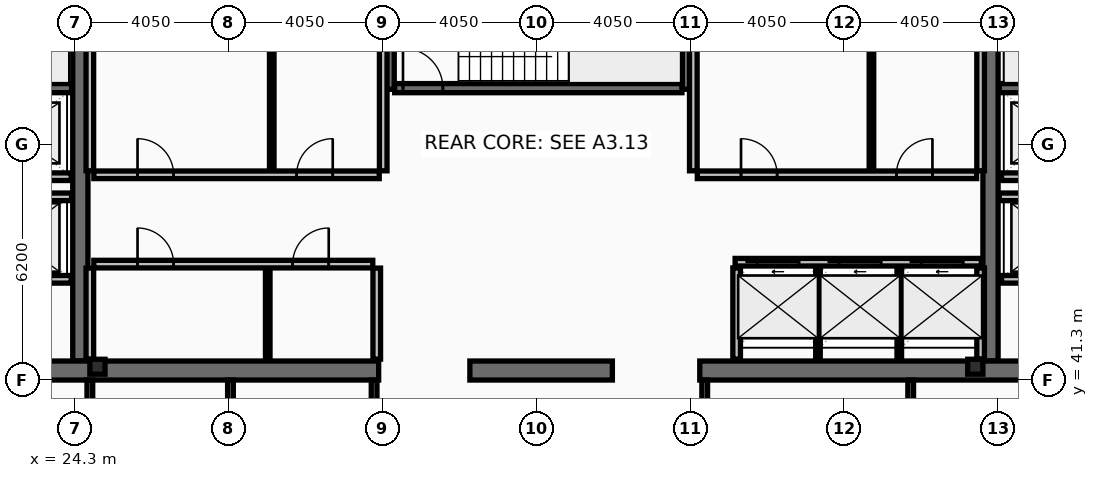
"""IFC4 building model, lengths in metres.
Left out: names, types, materials, properties, quantities, classifications, styles, units other than length and angle.
Written with IfcOpenShell. Run it as: python <this file> out.ifc"""

import sys

from ifc_helpers import new_model, si_unit, direction, frame, frame_2d, origin, origin_2d, place, context, subcontext, project, spatial, rectangle, i_section, extrude, element, fill, save


model = new_model("IFC4")
c1 = context("Model", 3, precision=1e-05, world=origin(), true_north=direction((0.0, 1.0)))
c2 = subcontext(c1, "Body", "Model", "MODEL_VIEW")
j1 = project(units=[si_unit("LENGTHUNIT", "METRE"), si_unit("PLANEANGLEUNIT", "RADIAN")], contexts=[c1])
p1 = place(None, origin())
s1 = spatial("IfcSite", under=j1, at=p1, CompositionType="ELEMENT")
p2 = place(p1, origin())
s2 = spatial("IfcBuilding", under=s1, at=p2, CompositionType="ELEMENT")
p3 = place(p2, frame((0.0, 0.0, 314.6)))
s3 = spatial("IfcBuildingStorey", under=s2, at=p3, CompositionType="ELEMENT", Elevation=314.6)
for number, where, z_axis, x_axis in (
    (1, (24.45, 41.8, 0.0), (0.0, 0.0, 1.0), (0.0, 1.0, 0.0)),
    (2, (48.4, 41.8, 0.0), (0.0, 0.0, 1.0), (0.0, 1.0, 0.0)),
):
    element("IfcWall", number, at=place(p3, frame(where, z_axis=z_axis, x_axis=x_axis)), inside=s3, PredefinedType="SHEAR", context=c2, shape_type="SweptSolid", body=[
        extrude(rectangle(XDim=11.4, YDim=0.4, at=frame_2d((5.7, 0.0))), origin(), (0.0, 0.0, 1.0), 3.44),
    ])
p4 = place(p3, frame((32.3, 41.55, 0.0), z_axis=(0.0, 0.0, 1.0), x_axis=(-1.0, 0.0, 0.0)))
e3 = element("IfcWall", 3, at=p4, inside=s3, PredefinedType="SHEAR", context=c2, shape_type="SweptSolid", body=[
    extrude(rectangle(XDim=11.45, YDim=0.5, at=frame_2d((5.725, 0.0))), origin(), (0.0, 0.0, 1.0), 3.44),
])
p5 = place(p3, frame((38.45, 41.55, 0.0), z_axis=(0.0, 0.0, 1.0), x_axis=(-1.0, 0.0, 0.0)))
e4 = element("IfcWall", 4, at=p5, inside=s3, PredefinedType="SHEAR", context=c2, shape_type="SweptSolid", body=[
    extrude(rectangle(XDim=3.75, YDim=0.5, at=frame_2d((1.875, 0.0))), origin(), (0.0, 0.0, 1.0), 3.44),
])
p6 = place(p3, frame((52.05, 41.55, 0.0), z_axis=(0.0, 0.0, 1.0), x_axis=(-1.0, 0.0, 0.0)))
e5 = element("IfcWall", 5, at=p6, inside=s3, PredefinedType="SHEAR", context=c2, shape_type="SweptSolid", body=[
    extrude(rectangle(XDim=11.3, YDim=0.5, at=frame_2d((5.65, 0.0))), origin(), (0.0, 0.0, 1.0), 3.44),
])
for number, where, z_axis, x_axis in (
    (6, (32.58, 48.95, 0.0), (0.0, 0.0, 1.0), (0.0, 1.0, 0.0)),
    (7, (40.42, 48.95, 0.0), (0.0, 0.0, 1.0), (0.0, 1.0, 0.0)),
):
    element("IfcWall", number, at=place(p3, frame(where, z_axis=z_axis, x_axis=x_axis)), inside=s3, PredefinedType="SHEAR", context=c2, shape_type="SweptSolid", body=[
        extrude(rectangle(XDim=4.25, YDim=0.26, at=frame_2d((2.125, 0.0))), origin(), (0.0, 0.0, 1.0), 3.44),
    ])
p7 = place(p3, frame((16.7, 48.98, 0.0), z_axis=(0.0, 0.0, 1.0), x_axis=(1.0, 0.0, 0.0)))
e8 = element("IfcWall", 8, at=p7, inside=s3, PredefinedType="SHEAR", context=c2, shape_type="SweptSolid", body=[
    extrude(rectangle(XDim=7.52, YDim=0.24, at=frame_2d((3.76, 0.0))), origin(), (0.0, 0.0, 1.0), 3.44),
])
p8 = place(p7, frame((0.22, 0.0, 0.0)))
e9 = element("IfcOpeningElement", 9, at=p8, cuts=e8, PredefinedType="OPENING", context=c2, shape_type="SweptSolid", body=[
    extrude(rectangle(XDim=1.05, YDim=2.15, at=frame_2d((0.525, 1.075))), frame((0.0, 0.13, 0.0), z_axis=(0.0, -1.0, 0.0), x_axis=(1.0, 0.0, 0.0)), (0.0, 0.0, 1.0), 0.26),
])
p9 = place(p3, frame((48.63, 48.98, 0.0), z_axis=(0.0, 0.0, 1.0), x_axis=(1.0, 0.0, 0.0)))
e10 = element("IfcWall", 10, at=p9, inside=s3, PredefinedType="SHEAR", context=c2, shape_type="SweptSolid", body=[
    extrude(rectangle(XDim=7.57, YDim=0.24, at=frame_2d((3.785, 0.0))), origin(), (0.0, 0.0, 1.0), 3.44),
])
p10 = place(p9, frame((6.3, 0.0, 0.0)))
e11 = element("IfcOpeningElement", 11, at=p10, cuts=e10, PredefinedType="OPENING", context=c2, shape_type="SweptSolid", body=[
    extrude(rectangle(XDim=1.05, YDim=2.15, at=frame_2d((0.525, 1.075))), frame((0.0, 0.13, 0.0), z_axis=(0.0, -1.0, 0.0), x_axis=(1.0, 0.0, 0.0)), (0.0, 0.0, 1.0), 0.26),
])
p11 = place(p3, frame((32.72, 48.98, 0.0), z_axis=(0.0, 0.0, 1.0), x_axis=(1.0, 0.0, 0.0)))
e12 = element("IfcWall", 12, at=p11, inside=s3, PredefinedType="SHEAR", context=c2, shape_type="SweptSolid", body=[
    extrude(rectangle(XDim=7.56, YDim=0.24, at=frame_2d((3.78, 0.0))), origin(), (0.0, 0.0, 1.0), 3.44),
])
p12 = place(p11, frame((0.22, 0.0, 0.0)))
e13 = element("IfcOpeningElement", 13, at=p12, cuts=e12, PredefinedType="OPENING", context=c2, shape_type="SweptSolid", body=[
    extrude(rectangle(XDim=1.05, YDim=2.15, at=frame_2d((0.525, 1.075))), frame((0.0, 0.13, 0.0), z_axis=(0.0, -1.0, 0.0), x_axis=(1.0, 0.0, 0.0)), (0.0, 0.0, 1.0), 0.26),
])
for number, where, z_axis, x_axis in (
    (14, (24.9, 41.65, 0.0), (0.0, 0.0, 1.0), (1.0, 0.0, 0.0)),
    (15, (48.0, 41.65, 0.0), (0.0, 0.0, 1.0), (1.0, 0.0, 0.0)),
):
    element("IfcColumn", number, at=place(p3, frame(where, z_axis=z_axis, x_axis=x_axis)), inside=s3, PredefinedType="COLUMN", context=c2, shape_type="SweptSolid", body=[
        extrude(i_section(OverallWidth=0.399, OverallDepth=0.393, WebThickness=0.023, FlangeThickness=0.037, at=origin_2d()), origin(), (0.0, 0.0, 1.0), 3.6),
    ])
p13 = place(p3, frame((41.68, 44.4, 0.0), z_axis=(0.0, 0.0, 1.0), x_axis=(1.0, 0.0, 0.0)))
e16 = element("IfcWall", 16, at=p13, inside=s3, PredefinedType="PARTITIONING", context=c2, shape_type="SweptSolid", body=[
    extrude(rectangle(XDim=6.48, YDim=0.2, at=frame_2d((3.24, 0.0))), origin(), (0.0, 0.0, 1.0), 3.44),
])
p14 = place(p13, frame((0.58, 0.0, 0.0)))
e17 = element("IfcOpeningElement", 17, at=p14, cuts=e16, PredefinedType="OPENING", context=c2, shape_type="SweptSolid", body=[
    extrude(rectangle(XDim=1.1, YDim=2.18, at=frame_2d((0.55, 1.09))), frame((0.0, 0.11, 0.0), z_axis=(0.0, -1.0, 0.0), x_axis=(1.0, 0.0, 0.0)), (0.0, 0.0, 1.0), 0.22),
])
p15 = place(p13, frame((2.74, 0.0, 0.0)))
e18 = element("IfcOpeningElement", 18, at=p15, cuts=e16, PredefinedType="OPENING", context=c2, shape_type="SweptSolid", body=[
    extrude(rectangle(XDim=1.1, YDim=2.18, at=frame_2d((0.55, 1.09))), frame((0.0, 0.11, 0.0), z_axis=(0.0, -1.0, 0.0), x_axis=(1.0, 0.0, 0.0)), (0.0, 0.0, 1.0), 0.22),
])
p16 = place(p13, frame((4.9, 0.0, 0.0)))
e19 = element("IfcOpeningElement", 19, at=p16, cuts=e16, PredefinedType="OPENING", context=c2, shape_type="SweptSolid", body=[
    extrude(rectangle(XDim=1.1, YDim=2.18, at=frame_2d((0.55, 1.09))), frame((0.0, 0.11, 0.0), z_axis=(0.0, -1.0, 0.0), x_axis=(1.0, 0.0, 0.0)), (0.0, 0.0, 1.0), 0.22),
])
p17 = place(p3, frame((51.61, 43.95, 0.0), z_axis=(0.0, 0.0, 1.0), x_axis=(-1.0, 0.0, 0.0)))
e20 = element("IfcWall", 20, at=p17, inside=s3, PredefinedType="PARTITIONING", context=c2, shape_type="SweptSolid", body=[
    extrude(rectangle(XDim=2.92, YDim=0.2, at=frame_2d((1.46, 0.0))), origin(), (0.0, 0.0, 1.0), 3.44),
])
p18 = place(p17, frame((0.81, 0.0, 0.0)))
e21 = element("IfcOpeningElement", 21, at=p18, cuts=e20, PredefinedType="OPENING", context=c2, shape_type="SweptSolid", body=[
    extrude(rectangle(XDim=1.3, YDim=2.18, at=frame_2d((0.65, 1.09))), frame((0.0, 0.11, 0.0), z_axis=(0.0, -1.0, 0.0), x_axis=(1.0, 0.0, 0.0)), (0.0, 0.0, 1.0), 0.22),
])
p19 = place(p3, frame((24.21, 43.95, 0.0), z_axis=(0.0, 0.0, 1.0), x_axis=(-1.0, 0.0, 0.0)))
e22 = element("IfcWall", 22, at=p19, inside=s3, PredefinedType="PARTITIONING", context=c2, shape_type="SweptSolid", body=[
    extrude(rectangle(XDim=2.97, YDim=0.2, at=frame_2d((1.485, 0.0))), origin(), (0.0, 0.0, 1.0), 3.44),
])
p20 = place(p19, frame((0.86, 0.0, 0.0)))
e23 = element("IfcOpeningElement", 23, at=p20, cuts=e22, PredefinedType="OPENING", context=c2, shape_type="SweptSolid", body=[
    extrude(rectangle(XDim=1.3, YDim=2.18, at=frame_2d((0.65, 1.09))), frame((0.0, 0.11, 0.0), z_axis=(0.0, -1.0, 0.0), x_axis=(1.0, 0.0, 0.0)), (0.0, 0.0, 1.0), 0.22),
])
p21 = place(p3, frame((51.61, 46.65, 0.0), z_axis=(0.0, 0.0, 1.0), x_axis=(-1.0, 0.0, 0.0)))
e24 = element("IfcWall", 24, at=p21, inside=s3, PredefinedType="PARTITIONING", context=c2, shape_type="SweptSolid", body=[
    extrude(rectangle(XDim=2.92, YDim=0.2, at=frame_2d((1.46, 0.0))), origin(), (0.0, 0.0, 1.0), 3.44),
])
p22 = place(p21, frame((0.86, 0.0, 0.0)))
e25 = element("IfcOpeningElement", 25, at=p22, cuts=e24, PredefinedType="OPENING", context=c2, shape_type="SweptSolid", body=[
    extrude(rectangle(XDim=1.2, YDim=2.18, at=frame_2d((0.6, 1.09))), frame((0.0, 0.11, 0.0), z_axis=(0.0, -1.0, 0.0), x_axis=(1.0, 0.0, 0.0)), (0.0, 0.0, 1.0), 0.22),
])
p23 = place(p3, frame((24.21, 46.65, 0.0), z_axis=(0.0, 0.0, 1.0), x_axis=(-1.0, 0.0, 0.0)))
e26 = element("IfcWall", 26, at=p23, inside=s3, PredefinedType="PARTITIONING", context=c2, shape_type="SweptSolid", body=[
    extrude(rectangle(XDim=2.97, YDim=0.2, at=frame_2d((1.485, 0.0))), origin(), (0.0, 0.0, 1.0), 3.44),
])
p24 = place(p23, frame((0.91, 0.0, 0.0)))
e27 = element("IfcOpeningElement", 27, at=p24, cuts=e26, PredefinedType="OPENING", context=c2, shape_type="SweptSolid", body=[
    extrude(rectangle(XDim=1.2, YDim=2.18, at=frame_2d((0.6, 1.09))), frame((0.0, 0.11, 0.0), z_axis=(0.0, -1.0, 0.0), x_axis=(1.0, 0.0, 0.0)), (0.0, 0.0, 1.0), 0.22),
])
p25 = place(p3, frame((21.2, 46.12, 0.0), z_axis=(0.0, 0.0, 1.0), x_axis=(1.0, 0.0, 0.0)))
e28 = element("IfcWall", 28, at=p25, inside=s3, PredefinedType="PARTITIONING", context=c2, shape_type="SweptSolid", body=[
    extrude(rectangle(XDim=3.02, YDim=0.2, at=frame_2d((1.51, 0.0))), origin(), (0.0, 0.0, 1.0), 3.44),
])
p26 = place(p3, frame((48.63, 46.12, 0.0), z_axis=(0.0, 0.0, 1.0), x_axis=(1.0, 0.0, 0.0)))
e29 = element("IfcWall", 29, at=p26, inside=s3, PredefinedType="PARTITIONING", context=c2, shape_type="SweptSolid", body=[
    extrude(rectangle(XDim=3.07, YDim=0.2, at=frame_2d((1.535, 0.0))), origin(), (0.0, 0.0, 1.0), 3.44),
])
for number, where, z_axis, x_axis in (
    (30, (24.7, 46.805, 0.0), (0.0, 0.0, 1.0), (0.0, 1.0, 0.0)),
    (31, (32.42, 46.805, 0.0), (0.0, 0.0, 1.0), (0.0, 1.0, 0.0)),
):
    element("IfcWall", number, at=place(p3, frame(where, z_axis=z_axis, x_axis=x_axis)), inside=s3, PredefinedType="PARTITIONING", context=c2, shape_type="SweptSolid", body=[
        extrude(rectangle(XDim=5.99, YDim=0.2, at=frame_2d((2.995, 0.0))), origin(), (0.0, 0.0, 1.0), 3.44),
    ])
p27 = place(p3, frame((29.486, 46.805, 0.0), z_axis=(0.0, 0.0, 1.0), x_axis=(0.0, 1.0, 0.0)))
e32 = element("IfcWall", 32, at=p27, inside=s3, PredefinedType="PARTITIONING", context=c2, shape_type="SweptSolid", body=[
    extrude(rectangle(XDim=5.99, YDim=0.12, at=frame_2d((2.995, 0.0))), origin(), (0.0, 0.0, 1.0), 3.44),
])
p28 = place(p3, frame((24.805, 46.7, 0.0), z_axis=(0.0, 0.0, 1.0), x_axis=(1.0, 0.0, 0.0)))
e33 = element("IfcWall", 33, at=p28, inside=s3, PredefinedType="PARTITIONING", context=c2, shape_type="SweptSolid", body=[
    extrude(rectangle(XDim=7.51, YDim=0.2, at=frame_2d((3.755, 0.0))), origin(), (0.0, 0.0, 1.0), 3.44),
])
p29 = place(p28, frame((1.15, 0.0, 0.0)))
e34 = element("IfcOpeningElement", 34, at=p29, cuts=e33, PredefinedType="OPENING", context=c2, shape_type="SweptSolid", body=[
    extrude(rectangle(XDim=0.95, YDim=2.1, at=frame_2d((0.475, 1.05))), frame((0.0, 0.11, 0.0), z_axis=(0.0, -1.0, 0.0), x_axis=(1.0, 0.0, 0.0)), (0.0, 0.0, 1.0), 0.22),
])
p30 = place(p28, frame((5.336, 0.0, 0.0)))
e35 = element("IfcOpeningElement", 35, at=p30, cuts=e33, PredefinedType="OPENING", context=c2, shape_type="SweptSolid", body=[
    extrude(rectangle(XDim=0.95, YDim=2.1, at=frame_2d((0.475, 1.05))), frame((0.0, 0.11, 0.0), z_axis=(0.0, -1.0, 0.0), x_axis=(1.0, 0.0, 0.0)), (0.0, 0.0, 1.0), 0.22),
])
for number, where, z_axis, x_axis in (
    (36, (24.7, 41.85, 0.0), (0.0, 0.0, 1.0), (0.0, 1.0, 0.0)),
    (37, (32.25, 41.85, 0.0), (0.0, 0.0, 1.0), (0.0, 1.0, 0.0)),
):
    element("IfcWall", number, at=place(p3, frame(where, z_axis=z_axis, x_axis=x_axis)), inside=s3, PredefinedType="PARTITIONING", context=c2, shape_type="SweptSolid", body=[
        extrude(rectangle(XDim=2.395, YDim=0.2, at=frame_2d((1.198, 0.0))), origin(), (0.0, 0.0, 1.0), 3.44),
    ])
p31 = place(p3, frame((29.381, 41.85, 0.0), z_axis=(0.0, 0.0, 1.0), x_axis=(0.0, 1.0, 0.0)))
e38 = element("IfcWall", 38, at=p31, inside=s3, PredefinedType="PARTITIONING", context=c2, shape_type="SweptSolid", body=[
    extrude(rectangle(XDim=2.395, YDim=0.12, at=frame_2d((1.198, 0.0))), origin(), (0.0, 0.0, 1.0), 3.44),
])
p32 = place(p3, frame((24.805, 44.35, 0.0), z_axis=(0.0, 0.0, 1.0), x_axis=(1.0, 0.0, 0.0)))
e39 = element("IfcWall", 39, at=p32, inside=s3, PredefinedType="PARTITIONING", context=c2, shape_type="SweptSolid", body=[
    extrude(rectangle(XDim=7.34, YDim=0.2, at=frame_2d((3.67, 0.0))), origin(), (0.0, 0.0, 1.0), 3.44),
])
p33 = place(p32, frame((1.15, 0.0, 0.0)))
e40 = element("IfcOpeningElement", 40, at=p33, cuts=e39, PredefinedType="OPENING", context=c2, shape_type="SweptSolid", body=[
    extrude(rectangle(XDim=0.95, YDim=2.1, at=frame_2d((0.475, 1.05))), frame((0.0, 0.11, 0.0), z_axis=(0.0, -1.0, 0.0), x_axis=(1.0, 0.0, 0.0)), (0.0, 0.0, 1.0), 0.22),
])
p34 = place(p32, frame((5.231, 0.0, 0.0)))
e41 = element("IfcOpeningElement", 41, at=p34, cuts=e39, PredefinedType="OPENING", context=c2, shape_type="SweptSolid", body=[
    extrude(rectangle(XDim=0.95, YDim=2.1, at=frame_2d((0.475, 1.05))), frame((0.0, 0.11, 0.0), z_axis=(0.0, -1.0, 0.0), x_axis=(1.0, 0.0, 0.0)), (0.0, 0.0, 1.0), 0.22),
])
for number, where, z_axis, x_axis in (
    (42, (40.58, 46.805, 0.0), (0.0, 0.0, 1.0), (0.0, 1.0, 0.0)),
    (43, (48.14, 46.805, 0.0), (0.0, 0.0, 1.0), (0.0, 1.0, 0.0)),
):
    element("IfcWall", number, at=place(p3, frame(where, z_axis=z_axis, x_axis=x_axis)), inside=s3, PredefinedType="PARTITIONING", context=c2, shape_type="SweptSolid", body=[
        extrude(rectangle(XDim=5.99, YDim=0.2, at=frame_2d((2.995, 0.0))), origin(), (0.0, 0.0, 1.0), 3.44),
    ])
p35 = place(p3, frame((45.267, 46.805, 0.0), z_axis=(0.0, 0.0, 1.0), x_axis=(0.0, 1.0, 0.0)))
e44 = element("IfcWall", 44, at=p35, inside=s3, PredefinedType="PARTITIONING", context=c2, shape_type="SweptSolid", body=[
    extrude(rectangle(XDim=5.99, YDim=0.12, at=frame_2d((2.995, 0.0))), origin(), (0.0, 0.0, 1.0), 3.44),
])
p36 = place(p3, frame((40.685, 46.7, 0.0), z_axis=(0.0, 0.0, 1.0), x_axis=(1.0, 0.0, 0.0)))
e45 = element("IfcWall", 45, at=p36, inside=s3, PredefinedType="PARTITIONING", context=c2, shape_type="SweptSolid", body=[
    extrude(rectangle(XDim=7.35, YDim=0.2, at=frame_2d((3.675, 0.0))), origin(), (0.0, 0.0, 1.0), 3.44),
])
p37 = place(p36, frame((1.15, 0.0, 0.0)))
e46 = element("IfcOpeningElement", 46, at=p37, cuts=e45, PredefinedType="OPENING", context=c2, shape_type="SweptSolid", body=[
    extrude(rectangle(XDim=0.95, YDim=2.1, at=frame_2d((0.475, 1.05))), frame((0.0, 0.11, 0.0), z_axis=(0.0, -1.0, 0.0), x_axis=(1.0, 0.0, 0.0)), (0.0, 0.0, 1.0), 0.22),
])
p38 = place(p36, frame((5.237, 0.0, 0.0)))
e47 = element("IfcOpeningElement", 47, at=p38, cuts=e45, PredefinedType="OPENING", context=c2, shape_type="SweptSolid", body=[
    extrude(rectangle(XDim=0.95, YDim=2.1, at=frame_2d((0.475, 1.05))), frame((0.0, 0.11, 0.0), z_axis=(0.0, -1.0, 0.0), x_axis=(1.0, 0.0, 0.0)), (0.0, 0.0, 1.0), 0.22),
])
for number, where, z_axis, x_axis in (
    (48, (41.72, 41.85, 0.0), (0.0, 0.0, 1.0), (0.0, 1.0, 0.0)),
    (49, (48.14, 41.85, 0.0), (0.0, 0.0, 1.0), (0.0, 1.0, 0.0)),
):
    element("IfcWall", number, at=place(p3, frame(where, z_axis=z_axis, x_axis=x_axis)), inside=s3, PredefinedType="PARTITIONING", context=c2, shape_type="SweptSolid", body=[
        extrude(rectangle(XDim=2.4, YDim=0.2, at=frame_2d((1.2, 0.0))), origin(), (0.0, 0.0, 1.0), 3.44),
    ])
for number, where, z_axis, x_axis in (
    (50, (43.86, 41.85, 0.0), (0.0, 0.0, 1.0), (0.0, 1.0, 0.0)),
    (51, (46.0, 41.85, 0.0), (0.0, 0.0, 1.0), (0.0, 1.0, 0.0)),
):
    element("IfcWall", number, at=place(p3, frame(where, z_axis=z_axis, x_axis=x_axis)), inside=s3, PredefinedType="PARTITIONING", context=c2, shape_type="SweptSolid", body=[
        extrude(rectangle(XDim=2.4, YDim=0.12, at=frame_2d((1.2, 0.0))), origin(), (0.0, 0.0, 1.0), 3.44),
    ])
p39 = place(p3, frame((24.7, 38.28, 0.0), z_axis=(0.0, 0.0, 1.0), x_axis=(0.0, 1.0, 0.0)))
e52 = element("IfcWall", 52, at=p39, inside=s3, PredefinedType="PARTITIONING", context=c2, shape_type="SweptSolid", body=[
    extrude(rectangle(XDim=3.02, YDim=0.15, at=frame_2d((1.51, 0.0))), origin(), (0.0, 0.0, 1.0), 2.83),
])
for number, where, z_axis, x_axis in (
    (53, (28.4, 38.28, 0.0), (0.0, 0.0, 1.0), (0.0, 1.0, 0.0)),
    (54, (32.18, 38.28, 0.0), (0.0, 0.0, 1.0), (0.0, 1.0, 0.0)),
    (55, (40.88, 38.28, 0.0), (0.0, 0.0, 1.0), (0.0, 1.0, 0.0)),
    (56, (46.3, 38.28, 0.0), (0.0, 0.0, 1.0), (0.0, 1.0, 0.0)),
):
    element("IfcWall", number, at=place(p3, frame(where, z_axis=z_axis, x_axis=x_axis)), inside=s3, PredefinedType="PARTITIONING", context=c2, shape_type="SweptSolid", body=[
        extrude(rectangle(XDim=3.02, YDim=0.15, at=frame_2d((1.51, 0.0))), origin(), (0.0, 0.0, 1.0), 3.44),
    ])
p40 = place(p12, origin())
e57 = element("IfcDoor", 57, at=p40, inside=s3, OperationType="SINGLE_SWING_LEFT", PredefinedType="DOOR", context=c2, shape_type="SweptSolid", body=[
    extrude(rectangle(XDim=1.05, YDim=2.15, at=frame_2d((0.525, 1.075))), frame((0.0, 0.025, 0.0), z_axis=(0.0, -1.0, 0.0), x_axis=(1.0, 0.0, 0.0)), (0.0, 0.0, 1.0), 0.05),
])
fill(e13, e57)
p41 = place(p14, origin())
e58 = element("IfcDoor", 58, at=p41, inside=s3, OperationType="SLIDING_TO_LEFT", PredefinedType="DOOR", context=c2, shape_type="SweptSolid", body=[
    extrude(rectangle(XDim=1.1, YDim=2.18, at=frame_2d((0.55, 1.09))), frame((0.0, 0.025, 0.0), z_axis=(0.0, -1.0, 0.0), x_axis=(1.0, 0.0, 0.0)), (0.0, 0.0, 1.0), 0.05),
])
fill(e17, e58)
p42 = place(p15, origin())
e59 = element("IfcDoor", 59, at=p42, inside=s3, OperationType="SLIDING_TO_LEFT", PredefinedType="DOOR", context=c2, shape_type="SweptSolid", body=[
    extrude(rectangle(XDim=1.1, YDim=2.18, at=frame_2d((0.55, 1.09))), frame((0.0, 0.025, 0.0), z_axis=(0.0, -1.0, 0.0), x_axis=(1.0, 0.0, 0.0)), (0.0, 0.0, 1.0), 0.05),
])
fill(e18, e59)
p43 = place(p16, origin())
e60 = element("IfcDoor", 60, at=p43, inside=s3, OperationType="SLIDING_TO_LEFT", PredefinedType="DOOR", context=c2, shape_type="SweptSolid", body=[
    extrude(rectangle(XDim=1.1, YDim=2.18, at=frame_2d((0.55, 1.09))), frame((0.0, 0.025, 0.0), z_axis=(0.0, -1.0, 0.0), x_axis=(1.0, 0.0, 0.0)), (0.0, 0.0, 1.0), 0.05),
])
fill(e19, e60)
p44 = place(p29, origin())
e61 = element("IfcDoor", 61, at=p44, inside=s3, OperationType="SINGLE_SWING_LEFT", PredefinedType="DOOR", context=c2, shape_type="SweptSolid", body=[
    extrude(rectangle(XDim=0.95, YDim=2.1, at=frame_2d((0.475, 1.05))), frame((0.0, 0.025, 0.0), z_axis=(0.0, -1.0, 0.0), x_axis=(1.0, 0.0, 0.0)), (0.0, 0.0, 1.0), 0.05),
])
fill(e34, e61)
p45 = place(p30, origin())
e62 = element("IfcDoor", 62, at=p45, inside=s3, OperationType="SINGLE_SWING_RIGHT", PredefinedType="DOOR", context=c2, shape_type="SweptSolid", body=[
    extrude(rectangle(XDim=0.95, YDim=2.1, at=frame_2d((0.475, 1.05))), frame((0.0, 0.025, 0.0), z_axis=(0.0, -1.0, 0.0), x_axis=(1.0, 0.0, 0.0)), (0.0, 0.0, 1.0), 0.05),
])
fill(e35, e62)
p46 = place(p33, origin())
e63 = element("IfcDoor", 63, at=p46, inside=s3, OperationType="SINGLE_SWING_LEFT", PredefinedType="DOOR", context=c2, shape_type="SweptSolid", body=[
    extrude(rectangle(XDim=0.95, YDim=2.1, at=frame_2d((0.475, 1.05))), frame((0.0, 0.025, 0.0), z_axis=(0.0, -1.0, 0.0), x_axis=(1.0, 0.0, 0.0)), (0.0, 0.0, 1.0), 0.05),
])
fill(e40, e63)
p47 = place(p34, origin())
e64 = element("IfcDoor", 64, at=p47, inside=s3, OperationType="SINGLE_SWING_RIGHT", PredefinedType="DOOR", context=c2, shape_type="SweptSolid", body=[
    extrude(rectangle(XDim=0.95, YDim=2.1, at=frame_2d((0.475, 1.05))), frame((0.0, 0.025, 0.0), z_axis=(0.0, -1.0, 0.0), x_axis=(1.0, 0.0, 0.0)), (0.0, 0.0, 1.0), 0.05),
])
fill(e41, e64)
p48 = place(p37, origin())
e65 = element("IfcDoor", 65, at=p48, inside=s3, OperationType="SINGLE_SWING_LEFT", PredefinedType="DOOR", context=c2, shape_type="SweptSolid", body=[
    extrude(rectangle(XDim=0.95, YDim=2.1, at=frame_2d((0.475, 1.05))), frame((0.0, 0.025, 0.0), z_axis=(0.0, -1.0, 0.0), x_axis=(1.0, 0.0, 0.0)), (0.0, 0.0, 1.0), 0.05),
])
fill(e46, e65)
p49 = place(p38, origin())
e66 = element("IfcDoor", 66, at=p49, inside=s3, OperationType="SINGLE_SWING_RIGHT", PredefinedType="DOOR", context=c2, shape_type="SweptSolid", body=[
    extrude(rectangle(XDim=0.95, YDim=2.1, at=frame_2d((0.475, 1.05))), frame((0.0, 0.025, 0.0), z_axis=(0.0, -1.0, 0.0), x_axis=(1.0, 0.0, 0.0)), (0.0, 0.0, 1.0), 0.05),
])
fill(e47, e66)
save(model, sys.argv[1])
